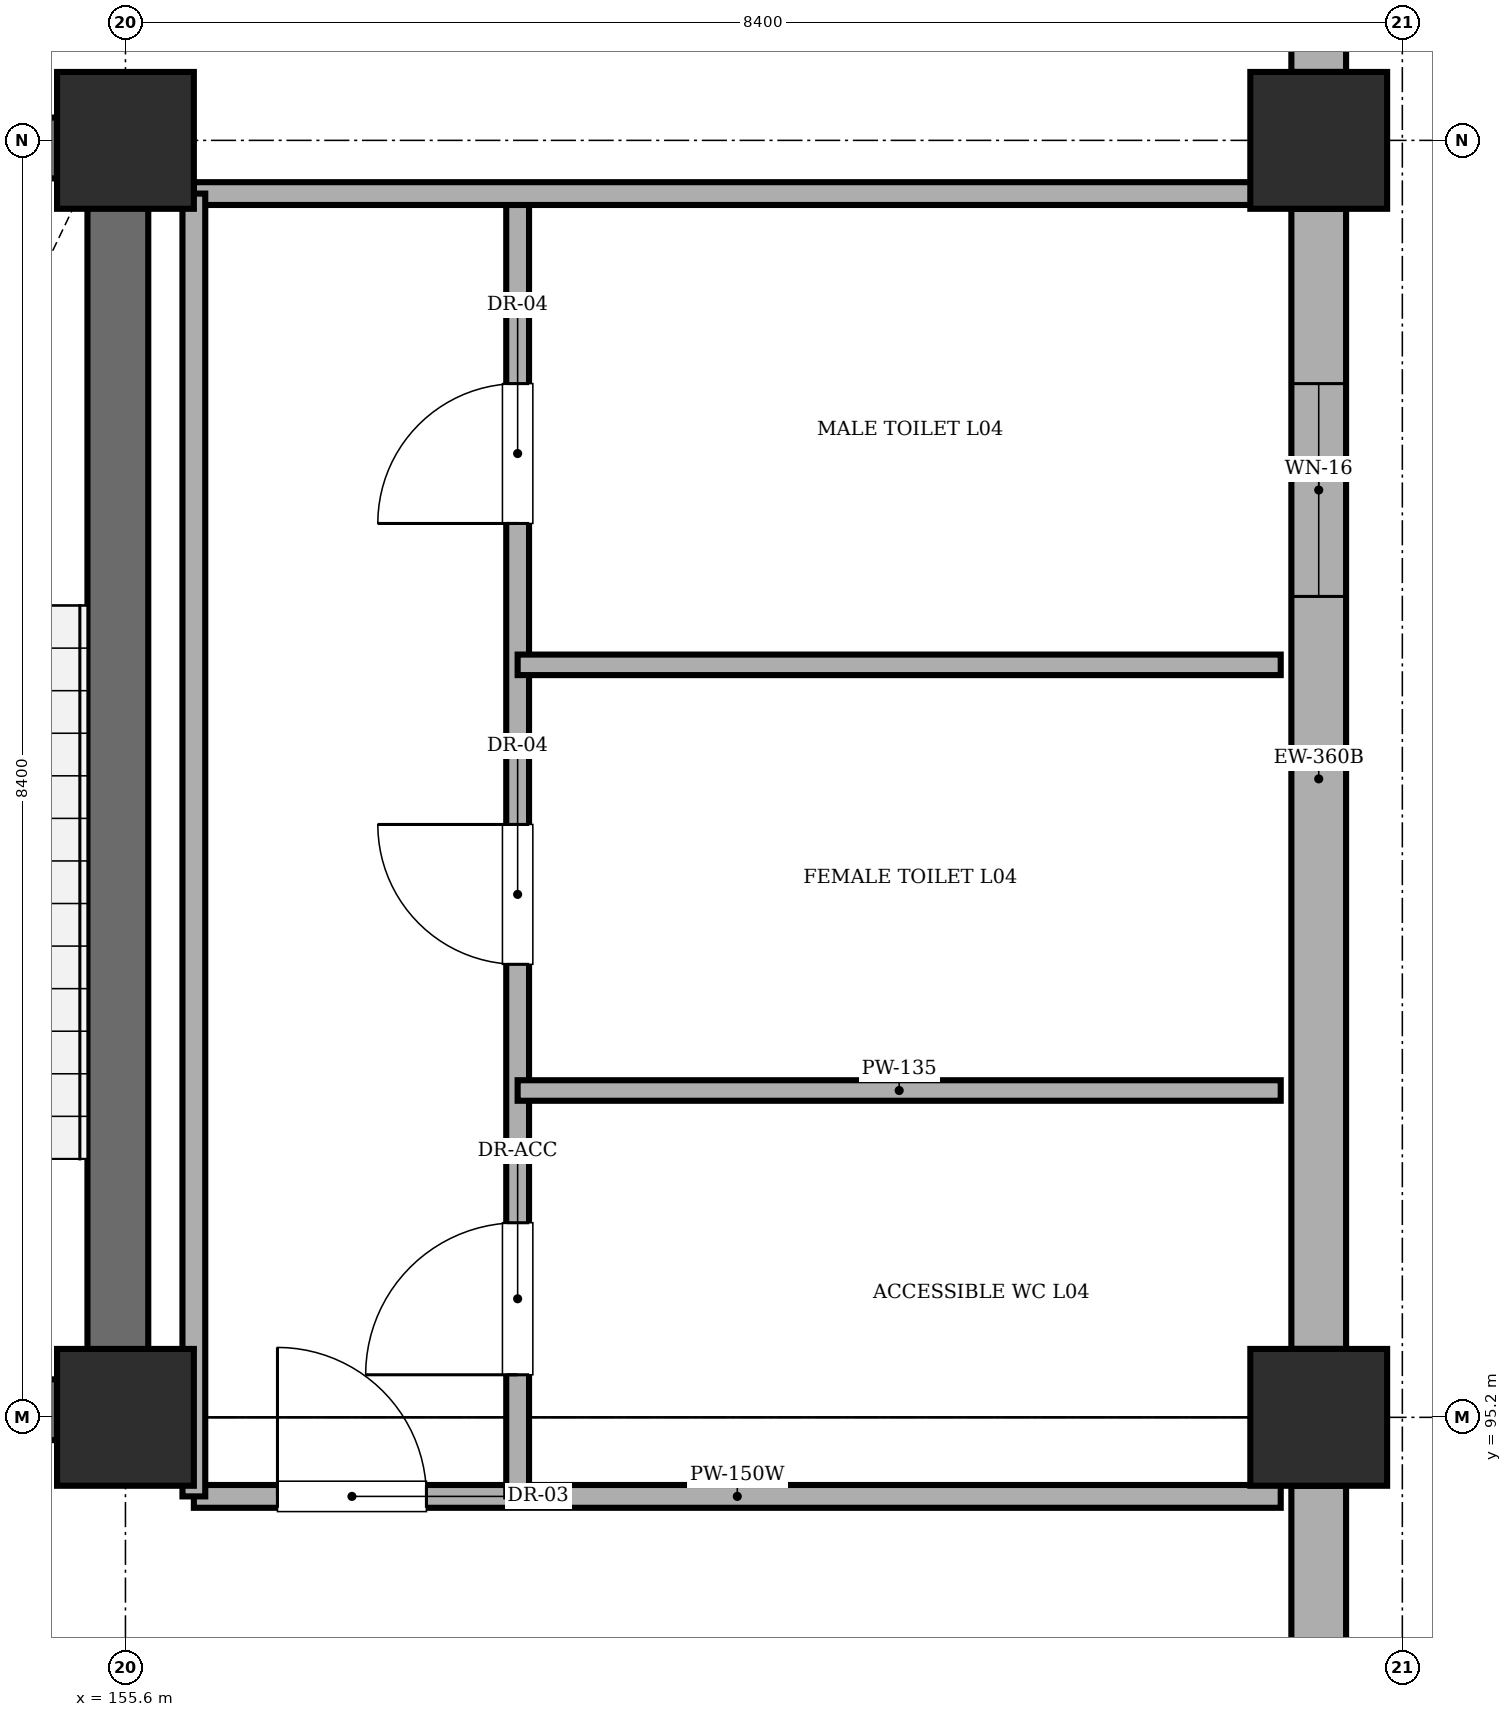
"""IFC4 building model, lengths in metres.
Left out: names, types, materials, properties, quantities, classifications, styles, units other than length and angle.
Written with IfcOpenShell. Run it as: python <this file> out.ifc"""

import sys

from ifc_helpers import new_model, si_unit, direction, frame, frame_2d, origin, origin_2d, place, context, subcontext, project, spatial, rectangle, extrude, element, fill, save


model = new_model("IFC4")
c1 = context("Model", 3, precision=1e-05, world=origin(), true_north=direction((0.0, 1.0)))
c2 = subcontext(c1, "Body", "Model", "MODEL_VIEW")
j1 = project(units=[si_unit("LENGTHUNIT", "METRE"), si_unit("PLANEANGLEUNIT", "RADIAN")], contexts=[c1])
p1 = place(None, origin())
s1 = spatial("IfcSite", under=j1, at=p1, CompositionType="ELEMENT")
p2 = place(p1, origin())
s2 = spatial("IfcBuilding", under=s1, at=p2, CompositionType="ELEMENT")
p3 = place(p2, frame((0.0, 0.0, 14.7)))
s3 = spatial("IfcBuildingStorey", under=s2, at=p3, CompositionType="ELEMENT", Elevation=14.7)
for number, where, z_axis, x_axis in (
    (1, (155.6, 95.2, 0.0), (0.0, 0.0, 1.0), (1.0, 0.0, 0.0)),
    (2, (155.6, 103.6, 0.0), (0.0, 0.0, 1.0), (1.0, 0.0, 0.0)),
    (3, (163.45, 95.2, 0.0), (0.0, 0.0, 1.0), (1.0, 0.0, 0.0)),
    (4, (163.45, 103.6, 0.0), (0.0, 0.0, 1.0), (1.0, 0.0, 0.0)),
):
    element("IfcColumn", number, at=place(p3, frame(where, z_axis=z_axis, x_axis=x_axis)), inside=s3, PredefinedType="COLUMN", context=c2, shape_type="SweptSolid", body=[
        extrude(rectangle(XDim=0.9, YDim=0.9, at=origin_2d()), origin(), (0.0, 0.0, 1.0), 4.26),
    ])
for number, where, z_axis, x_axis in (
    (5, (151.85, 95.25, 0.0), (0.0, 0.0, 1.0), (1.0, 0.0, 0.0)),
    (6, (151.85, 103.55, 0.0), (0.0, 0.0, 1.0), (1.0, 0.0, 0.0)),
):
    element("IfcWall", number, at=place(p3, frame(where, z_axis=z_axis, x_axis=x_axis)), inside=s3, PredefinedType="SHEAR", context=c2, shape_type="SweptSolid", body=[
        extrude(rectangle(XDim=3.9, YDim=0.4, at=frame_2d((1.95, 0.0))), origin(), (0.0, 0.0, 1.0), 4.26),
    ])
p4 = place(p3, frame((155.55, 95.45, 0.0), z_axis=(0.0, 0.0, 1.0), x_axis=(0.0, 1.0, 0.0)))
e7 = element("IfcWall", 7, at=p4, inside=s3, PredefinedType="SHEAR", context=c2, shape_type="SweptSolid", body=[
    extrude(rectangle(XDim=7.9, YDim=0.4, at=frame_2d((3.95, 0.0))), origin(), (0.0, 0.0, 1.0), 4.26),
])
p5 = place(p3, frame((163.45, 94.75, 0.0), z_axis=(0.0, 0.0, 1.0), x_axis=(0.0, -1.0, 0.0)))
e8 = element("IfcWall", 8, at=p5, inside=s3, PredefinedType="STANDARD", context=c2, shape_type="SweptSolid", body=[
    extrude(rectangle(XDim=7.5, YDim=0.36, at=frame_2d((3.75, 0.0))), origin(), (0.0, 0.0, 1.0), 3.56),
])
p6 = place(p5, frame((4.2, 0.0, 1.1)))
e9 = element("IfcOpeningElement", 9, at=p6, cuts=e8, PredefinedType="OPENING", context=c2, shape_type="SweptSolid", body=[
    extrude(rectangle(XDim=1.8, YDim=1.8, at=frame_2d((0.9, 0.9))), frame((0.0, 0.19, 0.0), z_axis=(0.0, -1.0, 0.0), x_axis=(1.0, 0.0, 0.0)), (0.0, 0.0, 1.0), 0.38),
])
p7 = place(p3, frame((163.45, 103.15, 0.0), z_axis=(0.0, 0.0, 1.0), x_axis=(0.0, -1.0, 0.0)))
e10 = element("IfcWall", 10, at=p7, inside=s3, PredefinedType="STANDARD", context=c2, shape_type="SweptSolid", body=[
    extrude(rectangle(XDim=7.5, YDim=0.36, at=frame_2d((3.75, 0.0))), origin(), (0.0, 0.0, 1.0), 3.56),
])
p8 = place(p7, frame((1.15, 0.0, 1.1)))
e11 = element("IfcOpeningElement", 11, at=p8, cuts=e10, PredefinedType="OPENING", context=c2, shape_type="SweptSolid", body=[
    extrude(rectangle(XDim=1.4, YDim=1.4, at=frame_2d((0.7, 0.7))), frame((0.0, 0.19, 0.0), z_axis=(0.0, -1.0, 0.0), x_axis=(1.0, 0.0, 0.0)), (0.0, 0.0, 1.0), 0.38),
])
p9 = place(p3, frame((163.45, 111.0, 0.0), z_axis=(0.0, 0.0, 1.0), x_axis=(0.0, -1.0, 0.0)))
e12 = element("IfcWall", 12, at=p9, inside=s3, PredefinedType="STANDARD", context=c2, shape_type="SweptSolid", body=[
    extrude(rectangle(XDim=6.95, YDim=0.36, at=frame_2d((3.475, 0.0))), origin(), (0.0, 0.0, 1.0), 3.56),
])
p10 = place(p9, frame((1.15, 0.0, 1.1)))
e13 = element("IfcOpeningElement", 13, at=p10, cuts=e12, PredefinedType="OPENING", context=c2, shape_type="SweptSolid", body=[
    extrude(rectangle(XDim=1.8, YDim=1.8, at=frame_2d((0.9, 0.9))), frame((0.0, 0.19, 0.0), z_axis=(0.0, -1.0, 0.0), x_axis=(1.0, 0.0, 0.0)), (0.0, 0.0, 1.0), 0.38),
])
p11 = place(p3, frame((156.05, 94.68, 0.0), z_axis=(0.0, 0.0, 1.0), x_axis=(1.0, 0.0, 0.0)))
e14 = element("IfcWall", 14, at=p11, inside=s3, PredefinedType="PARTITIONING", context=c2, shape_type="SweptSolid", body=[
    extrude(rectangle(XDim=7.15, YDim=0.15, at=frame_2d((3.575, 0.0))), origin(), (0.0, 0.0, 1.0), 4.26),
])
p12 = place(p11, frame((0.55, 0.0, 0.0)))
e15 = element("IfcOpeningElement", 15, at=p12, cuts=e14, PredefinedType="OPENING", context=c2, shape_type="SweptSolid", body=[
    extrude(rectangle(XDim=0.98, YDim=2.12, at=frame_2d((0.49, 1.06))), frame((0.0, 0.085, 0.0), z_axis=(0.0, -1.0, 0.0), x_axis=(1.0, 0.0, 0.0)), (0.0, 0.0, 1.0), 0.17),
])
p13 = place(p3, frame((158.18, 94.68, 0.0), z_axis=(0.0, 0.0, 1.0), x_axis=(0.0, 1.0, 0.0)))
e16 = element("IfcWall", 16, at=p13, inside=s3, PredefinedType="PARTITIONING", context=c2, shape_type="SweptSolid", body=[
    extrude(rectangle(XDim=8.57, YDim=0.15, at=frame_2d((4.285, 0.0))), origin(), (0.0, 0.0, 1.0), 4.26),
])
p14 = place(p13, frame((0.8, 0.0, 0.0)))
e17 = element("IfcOpeningElement", 17, at=p14, cuts=e16, PredefinedType="OPENING", context=c2, shape_type="SweptSolid", body=[
    extrude(rectangle(XDim=1.0, YDim=2.12, at=frame_2d((0.5, 1.06))), frame((0.0, 0.085, 0.0), z_axis=(0.0, -1.0, 0.0), x_axis=(1.0, 0.0, 0.0)), (0.0, 0.0, 1.0), 0.17),
])
p15 = place(p13, frame((3.5, 0.0, 0.0)))
e18 = element("IfcOpeningElement", 18, at=p15, cuts=e16, PredefinedType="OPENING", context=c2, shape_type="SweptSolid", body=[
    extrude(rectangle(XDim=0.92, YDim=2.1, at=frame_2d((0.46, 1.05))), frame((0.0, 0.085, 0.0), z_axis=(0.0, -1.0, 0.0), x_axis=(1.0, 0.0, 0.0)), (0.0, 0.0, 1.0), 0.17),
])
p16 = place(p13, frame((6.4, 0.0, 0.0)))
e19 = element("IfcOpeningElement", 19, at=p16, cuts=e16, PredefinedType="OPENING", context=c2, shape_type="SweptSolid", body=[
    extrude(rectangle(XDim=0.92, YDim=2.1, at=frame_2d((0.46, 1.05))), frame((0.0, 0.085, 0.0), z_axis=(0.0, -1.0, 0.0), x_axis=(1.0, 0.0, 0.0)), (0.0, 0.0, 1.0), 0.17),
])
for number, where, z_axis, x_axis in (
    (20, (158.18, 97.35, 0.0), (0.0, 0.0, 1.0), (1.0, 0.0, 0.0)),
    (21, (158.18, 100.15, 0.0), (0.0, 0.0, 1.0), (1.0, 0.0, 0.0)),
):
    element("IfcWall", number, at=place(p3, frame(where, z_axis=z_axis, x_axis=x_axis)), inside=s3, PredefinedType="PARTITIONING", context=c2, shape_type="SweptSolid", body=[
        extrude(rectangle(XDim=5.02, YDim=0.135, at=frame_2d((2.51, 0.0))), origin(), (0.0, 0.0, 1.0), 4.26),
    ])
p17 = place(p3, frame((156.05, 103.25, 0.0), z_axis=(0.0, 0.0, 1.0), x_axis=(1.0, 0.0, 0.0)))
e22 = element("IfcWall", 22, at=p17, inside=s3, PredefinedType="PARTITIONING", context=c2, shape_type="SweptSolid", body=[
    extrude(rectangle(XDim=7.15, YDim=0.15, at=frame_2d((3.575, 0.0))), origin(), (0.0, 0.0, 1.0), 4.26),
])
p18 = place(p3, frame((156.05, 94.68, 0.0), z_axis=(0.0, 0.0, 1.0), x_axis=(0.0, 1.0, 0.0)))
e23 = element("IfcWall", 23, at=p18, inside=s3, PredefinedType="PARTITIONING", context=c2, shape_type="SweptSolid", body=[
    extrude(rectangle(XDim=8.57, YDim=0.15, at=frame_2d((4.285, 0.0))), origin(), (0.0, 0.0, 1.0), 4.26),
])
p19 = place(p8, origin())
e24 = element("IfcWindow", 24, at=p19, inside=s3, PartitioningType="SINGLE_PANEL", PredefinedType="WINDOW", context=c2, shape_type="SweptSolid", body=[
    extrude(rectangle(XDim=1.4, YDim=1.4, at=frame_2d((0.7, 0.7))), frame((0.0, 0.03, 0.0), z_axis=(0.0, -1.0, 0.0), x_axis=(1.0, 0.0, 0.0)), (0.0, 0.0, 1.0), 0.06),
])
fill(e11, e24)
p20 = place(p12, origin())
e25 = element("IfcDoor", 25, at=p20, inside=s3, OperationType="SINGLE_SWING_LEFT", PredefinedType="DOOR", context=c2, shape_type="SweptSolid", body=[
    extrude(rectangle(XDim=0.98, YDim=2.12, at=frame_2d((0.49, 1.06))), frame((0.0, 0.025, 0.0), z_axis=(0.0, -1.0, 0.0), x_axis=(1.0, 0.0, 0.0)), (0.0, 0.0, 1.0), 0.05),
])
fill(e15, e25)
p21 = place(p14, origin())
e26 = element("IfcDoor", 26, at=p21, inside=s3, OperationType="SINGLE_SWING_LEFT", PredefinedType="DOOR", context=c2, shape_type="SweptSolid", body=[
    extrude(rectangle(XDim=1.0, YDim=2.12, at=frame_2d((0.5, 1.06))), frame((0.0, 0.025, 0.0), z_axis=(0.0, -1.0, 0.0), x_axis=(1.0, 0.0, 0.0)), (0.0, 0.0, 1.0), 0.05),
])
fill(e17, e26)
p22 = place(p15, origin())
e27 = element("IfcDoor", 27, at=p22, inside=s3, OperationType="SINGLE_SWING_RIGHT", PredefinedType="DOOR", context=c2, shape_type="SweptSolid", body=[
    extrude(rectangle(XDim=0.92, YDim=2.1, at=frame_2d((0.46, 1.05))), frame((0.0, 0.025, 0.0), z_axis=(0.0, -1.0, 0.0), x_axis=(1.0, 0.0, 0.0)), (0.0, 0.0, 1.0), 0.05),
])
fill(e18, e27)
p23 = place(p16, origin())
e28 = element("IfcDoor", 28, at=p23, inside=s3, OperationType="SINGLE_SWING_LEFT", PredefinedType="DOOR", context=c2, shape_type="SweptSolid", body=[
    extrude(rectangle(XDim=0.92, YDim=2.1, at=frame_2d((0.46, 1.05))), frame((0.0, 0.025, 0.0), z_axis=(0.0, -1.0, 0.0), x_axis=(1.0, 0.0, 0.0)), (0.0, 0.0, 1.0), 0.05),
])
fill(e19, e28)
save(model, sys.argv[1])
